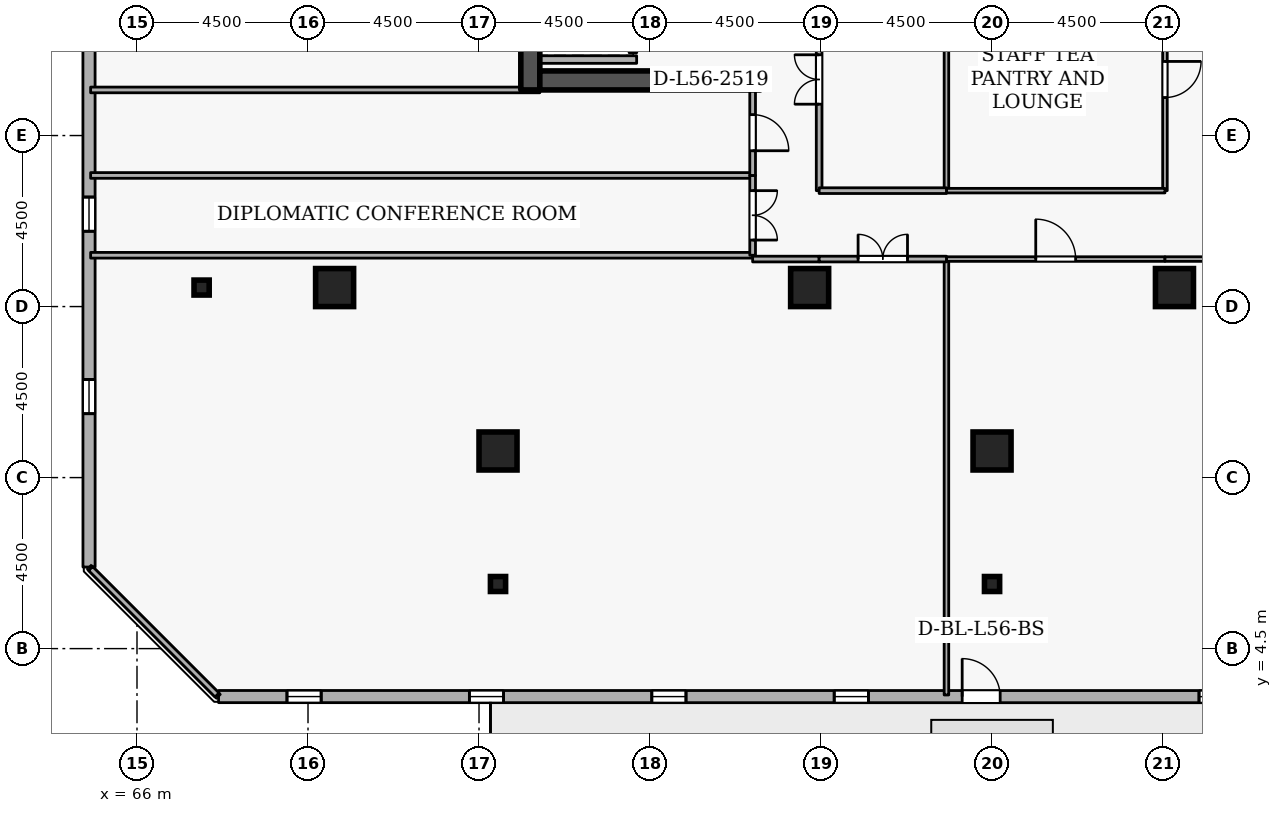
"""IFC4 building model, lengths in metres.
Left out: names, types, materials, properties, quantities, classifications, styles, units other than length and angle.
Written with IfcOpenShell. Run it as: python <this file> out.ifc"""

import sys

from ifc_helpers import new_model, si_unit, direction, frame, frame_2d, origin, origin_2d, place, context, subcontext, project, spatial, rectangle, i_section, extrude, element, fill, save


model = new_model("IFC4")
c1 = context("Model", 3, precision=1e-05, world=origin(), true_north=direction((0.0, 1.0)))
c2 = subcontext(c1, "Body", "Model", "MODEL_VIEW")
j1 = project(units=[si_unit("LENGTHUNIT", "METRE"), si_unit("PLANEANGLEUNIT", "RADIAN")], contexts=[c1])
p1 = place(None, origin())
s1 = spatial("IfcSite", under=j1, at=p1, CompositionType="ELEMENT")
p2 = place(p1, origin())
s2 = spatial("IfcBuilding", under=s1, at=p2, CompositionType="ELEMENT")
p3 = place(p2, frame((0.0, 0.0, 210.9)))
s3 = spatial("IfcBuildingStorey", under=s2, at=p3, CompositionType="ELEMENT", Elevation=210.9)
p4 = place(p3, frame((76.35, 19.2, 0.0), z_axis=(0.0, 0.0, 1.0), x_axis=(0.0, 1.0, 0.0)))
e1 = element("IfcWall", 1, at=p4, inside=s3, PredefinedType="SHEAR", context=c2, shape_type="SweptSolid", body=[
    extrude(rectangle(XDim=15.6, YDim=0.5, at=frame_2d((7.8, 0.0))), origin(), (0.0, 0.0, 1.0), 3.6),
])
p5 = place(p3, frame((76.6, 19.45, 0.0), z_axis=(0.0, 0.0, 1.0), x_axis=(1.0, 0.0, 0.0)))
e2 = element("IfcWall", 2, at=p5, inside=s3, PredefinedType="SHEAR", context=c2, shape_type="SweptSolid", body=[
    extrude(rectangle(XDim=5.8, YDim=0.5, at=frame_2d((2.9, 0.0))), origin(), (0.0, 0.0, 1.0), 3.6),
])
for number, where, z_axis, x_axis in (
    (3, (71.2, 14.0, 0.0), (0.0, 0.0, 1.0), (1.0, 0.0, 0.0)),
    (4, (88.5, 9.7, 0.0), (0.0, 0.0, 1.0), (1.0, 0.0, 0.0)),
    (5, (75.5, 9.7, 0.0), (0.0, 0.0, 1.0), (1.0, 0.0, 0.0)),
    (6, (93.3, 14.0, 0.0), (0.0, 0.0, 1.0), (1.0, 0.0, 0.0)),
    (7, (83.7, 14.0, 0.0), (0.0, 0.0, 1.0), (1.0, 0.0, 0.0)),
):
    element("IfcColumn", number, at=place(p3, frame(where, z_axis=z_axis, x_axis=x_axis)), inside=s3, PredefinedType="COLUMN", context=c2, shape_type="SweptSolid", body=[
        extrude(rectangle(XDim=1.0, YDim=1.0, at=origin_2d()), origin(), (0.0, 0.0, 1.0), 3.6),
    ])
for number, where, z_axis, x_axis in (
    (8, (67.7, 14.0, 0.0), (0.0, 0.0, 1.0), (1.0, 0.0, 0.0)),
    (9, (88.5, 6.2, 0.0), (0.0, 0.0, 1.0), (1.0, 0.0, 0.0)),
    (10, (75.5, 6.2, 0.0), (0.0, 0.0, 1.0), (1.0, 0.0, 0.0)),
):
    element("IfcColumn", number, at=place(p3, frame(where, z_axis=z_axis, x_axis=x_axis)), inside=s3, PredefinedType="COLUMN", context=c2, shape_type="SweptSolid", body=[
        extrude(i_section(OverallWidth=0.399, OverallDepth=0.394, WebThickness=0.023, FlangeThickness=0.037, FilletRadius=0.015, at=origin_2d()), origin(), (0.0, 0.0, 1.0), 3.6),
    ])
p6 = place(p3, frame((68.146, 3.238, 0.0), z_axis=(0.0, 0.0, 1.0), x_axis=(0.999999997144, -7.5574884e-05, 0.0)))
e11 = element("IfcWall", 11, at=p6, inside=s3, PredefinedType="STANDARD", context=c2, shape_type="SweptSolid", body=[
    extrude(rectangle(XDim=35.535, YDim=0.32, at=frame_2d((17.768, 0.0))), origin(), (0.0, 0.0, 1.0), 2.7),
])
p7 = place(p6, frame((19.567, 0.0, 0.0)))
e12 = element("IfcOpeningElement", 12, at=p7, cuts=e11, PredefinedType="OPENING", context=c2, shape_type="SweptSolid", body=[
    extrude(rectangle(XDim=1.0, YDim=2.08, at=frame_2d((0.5, 1.04))), frame((0.0, 0.17, 0.0), z_axis=(0.0, -1.0, 0.0), x_axis=(1.0, 0.0, 0.0)), (0.0, 0.0, 1.0), 0.34),
])
p8 = place(p6, frame((1.8, 0.0, 0.72)))
e13 = element("IfcOpeningElement", 13, at=p8, cuts=e11, PredefinedType="OPENING", context=c2, shape_type="SweptSolid", body=[
    extrude(rectangle(XDim=0.9, YDim=1.75, at=frame_2d((0.45, 0.875))), frame((0.0, 0.17, 0.0), z_axis=(0.0, -1.0, 0.0), x_axis=(1.0, 0.0, 0.0)), (0.0, 0.0, 1.0), 0.34),
])
p9 = place(p6, frame((6.6, 0.0, 0.72)))
e14 = element("IfcOpeningElement", 14, at=p9, cuts=e11, PredefinedType="OPENING", context=c2, shape_type="SweptSolid", body=[
    extrude(rectangle(XDim=0.9, YDim=1.75, at=frame_2d((0.45, 0.875))), frame((0.0, 0.17, 0.0), z_axis=(0.0, -1.0, 0.0), x_axis=(1.0, 0.0, 0.0)), (0.0, 0.0, 1.0), 0.34),
])
p10 = place(p6, frame((11.4, 0.0, 0.72)))
e15 = element("IfcOpeningElement", 15, at=p10, cuts=e11, PredefinedType="OPENING", context=c2, shape_type="SweptSolid", body=[
    extrude(rectangle(XDim=0.9, YDim=1.75, at=frame_2d((0.45, 0.875))), frame((0.0, 0.17, 0.0), z_axis=(0.0, -1.0, 0.0), x_axis=(1.0, 0.0, 0.0)), (0.0, 0.0, 1.0), 0.34),
])
p11 = place(p6, frame((16.2, 0.0, 0.72)))
e16 = element("IfcOpeningElement", 16, at=p11, cuts=e11, PredefinedType="OPENING", context=c2, shape_type="SweptSolid", body=[
    extrude(rectangle(XDim=0.9, YDim=1.75, at=frame_2d((0.45, 0.875))), frame((0.0, 0.17, 0.0), z_axis=(0.0, -1.0, 0.0), x_axis=(1.0, 0.0, 0.0)), (0.0, 0.0, 1.0), 0.34),
])
p12 = place(p6, frame((25.8, 0.0, 0.72)))
e17 = element("IfcOpeningElement", 17, at=p12, cuts=e11, PredefinedType="OPENING", context=c2, shape_type="SweptSolid", body=[
    extrude(rectangle(XDim=0.9, YDim=1.75, at=frame_2d((0.45, 0.875))), frame((0.0, 0.17, 0.0), z_axis=(0.0, -1.0, 0.0), x_axis=(1.0, 0.0, 0.0)), (0.0, 0.0, 1.0), 0.34),
])
p13 = place(p6, frame((30.6, 0.0, 0.72)))
e18 = element("IfcOpeningElement", 18, at=p13, cuts=e11, PredefinedType="OPENING", context=c2, shape_type="SweptSolid", body=[
    extrude(rectangle(XDim=0.9, YDim=1.75, at=frame_2d((0.45, 0.875))), frame((0.0, 0.17, 0.0), z_axis=(0.0, -1.0, 0.0), x_axis=(1.0, 0.0, 0.0)), (0.0, 0.0, 1.0), 0.34),
])
p14 = place(p3, frame((64.735, 42.181, 0.0), z_axis=(0.0, 0.0, 1.0), x_axis=(7.5574884e-05, -0.999999997144, 0.0)))
e19 = element("IfcWall", 19, at=p14, inside=s3, PredefinedType="STANDARD", context=c2, shape_type="SweptSolid", body=[
    extrude(rectangle(XDim=35.535, YDim=0.32, at=frame_2d((17.768, 0.0))), origin(), (0.0, 0.0, 1.0), 2.7),
])
p15 = place(p14, frame((1.8, 0.0, 0.72)))
e20 = element("IfcOpeningElement", 20, at=p15, cuts=e19, PredefinedType="OPENING", context=c2, shape_type="SweptSolid", body=[
    extrude(rectangle(XDim=0.9, YDim=1.75, at=frame_2d((0.45, 0.875))), frame((0.0, 0.17, 0.0), z_axis=(0.0, -1.0, 0.0), x_axis=(1.0, 0.0, 0.0)), (0.0, 0.0, 1.0), 0.34),
])
p16 = place(p14, frame((6.6, 0.0, 0.72)))
e21 = element("IfcOpeningElement", 21, at=p16, cuts=e19, PredefinedType="OPENING", context=c2, shape_type="SweptSolid", body=[
    extrude(rectangle(XDim=0.9, YDim=1.75, at=frame_2d((0.45, 0.875))), frame((0.0, 0.17, 0.0), z_axis=(0.0, -1.0, 0.0), x_axis=(1.0, 0.0, 0.0)), (0.0, 0.0, 1.0), 0.34),
])
p17 = place(p14, frame((11.4, 0.0, 0.72)))
e22 = element("IfcOpeningElement", 22, at=p17, cuts=e19, PredefinedType="OPENING", context=c2, shape_type="SweptSolid", body=[
    extrude(rectangle(XDim=0.9, YDim=1.75, at=frame_2d((0.45, 0.875))), frame((0.0, 0.17, 0.0), z_axis=(0.0, -1.0, 0.0), x_axis=(1.0, 0.0, 0.0)), (0.0, 0.0, 1.0), 0.34),
])
p18 = place(p14, frame((16.2, 0.0, 0.72)))
e23 = element("IfcOpeningElement", 23, at=p18, cuts=e19, PredefinedType="OPENING", context=c2, shape_type="SweptSolid", body=[
    extrude(rectangle(XDim=0.9, YDim=1.75, at=frame_2d((0.45, 0.875))), frame((0.0, 0.17, 0.0), z_axis=(0.0, -1.0, 0.0), x_axis=(1.0, 0.0, 0.0)), (0.0, 0.0, 1.0), 0.34),
])
p19 = place(p14, frame((21.0, 0.0, 0.72)))
e24 = element("IfcOpeningElement", 24, at=p19, cuts=e19, PredefinedType="OPENING", context=c2, shape_type="SweptSolid", body=[
    extrude(rectangle(XDim=0.9, YDim=1.75, at=frame_2d((0.45, 0.875))), frame((0.0, 0.17, 0.0), z_axis=(0.0, -1.0, 0.0), x_axis=(1.0, 0.0, 0.0)), (0.0, 0.0, 1.0), 0.34),
])
p20 = place(p14, frame((25.8, 0.0, 0.72)))
e25 = element("IfcOpeningElement", 25, at=p20, cuts=e19, PredefinedType="OPENING", context=c2, shape_type="SweptSolid", body=[
    extrude(rectangle(XDim=0.9, YDim=1.75, at=frame_2d((0.45, 0.875))), frame((0.0, 0.17, 0.0), z_axis=(0.0, -1.0, 0.0), x_axis=(1.0, 0.0, 0.0)), (0.0, 0.0, 1.0), 0.34),
])
p21 = place(p14, frame((30.6, 0.0, 0.72)))
e26 = element("IfcOpeningElement", 26, at=p21, cuts=e19, PredefinedType="OPENING", context=c2, shape_type="SweptSolid", body=[
    extrude(rectangle(XDim=0.9, YDim=1.75, at=frame_2d((0.45, 0.875))), frame((0.0, 0.17, 0.0), z_axis=(0.0, -1.0, 0.0), x_axis=(1.0, 0.0, 0.0)), (0.0, 0.0, 1.0), 0.34),
])
p22 = place(p3, frame((79.05, 20.18, 0.0), z_axis=(0.0, 0.0, 1.0), x_axis=(0.0, 1.0, 0.0)))
e27 = element("IfcWall", 27, at=p22, inside=s3, PredefinedType="STANDARD", context=c2, shape_type="SweptSolid", body=[
    extrude(rectangle(XDim=1.94, YDim=0.2, at=frame_2d((0.97, 0.0))), origin(), (0.0, 0.0, 1.0), 3.34),
])
p23 = place(p22, frame((0.46, 0.0, 0.0)))
e28 = element("IfcOpeningElement", 28, at=p23, cuts=e27, PredefinedType="OPENING", context=c2, shape_type="SweptSolid", body=[
    extrude(rectangle(XDim=1.02, YDim=2.06, at=frame_2d((0.51, 1.03))), frame((0.0, 0.11, 0.0), z_axis=(0.0, -1.0, 0.0), x_axis=(1.0, 0.0, 0.0)), (0.0, 0.0, 1.0), 0.22),
])
p24 = place(p3, frame((76.612, 20.0, 0.0), z_axis=(0.0, 0.0, 1.0), x_axis=(1.0, 0.0, 0.0)))
e29 = element("IfcWall", 29, at=p24, inside=s3, PredefinedType="STANDARD", context=c2, shape_type="SweptSolid", body=[
    extrude(rectangle(XDim=2.536, YDim=0.2, at=frame_2d((1.268, 0.0))), origin(), (0.0, 0.0, 1.0), 3.34),
])
for number, where, z_axis, x_axis in (
    (30, (82.2, 14.85, 0.0), (0.0, 0.0, 1.0), (-1.0, 0.0, 0.0)),
    (31, (64.78, 16.95, 0.0), (0.0, 0.0, 1.0), (1.0, 0.0, 0.0)),
):
    element("IfcWall", number, at=place(p3, frame(where, z_axis=z_axis, x_axis=x_axis)), inside=s3, PredefinedType="PARTITIONING", context=c2, shape_type="SweptSolid", body=[
        extrude(rectangle(XDim=17.42, YDim=0.15, at=frame_2d((8.71, 0.0))), origin(), (0.0, 0.0, 1.0), 3.34),
    ])
p25 = place(p3, frame((82.2, 16.95, 0.0), z_axis=(0.0, 0.0, 1.0), x_axis=(0.0, -1.0, 0.0)))
e32 = element("IfcWall", 32, at=p25, inside=s3, PredefinedType="PARTITIONING", context=c2, shape_type="SweptSolid", body=[
    extrude(rectangle(XDim=2.1, YDim=0.15, at=frame_2d((1.05, 0.0))), origin(), (0.0, 0.0, 1.0), 3.34),
])
p26 = place(p25, frame((0.4, 0.0, 0.0)))
e33 = element("IfcOpeningElement", 33, at=p26, cuts=e32, PredefinedType="OPENING", context=c2, shape_type="SweptSolid", body=[
    extrude(rectangle(XDim=1.3, YDim=2.12, at=frame_2d((0.65, 1.06))), frame((0.0, 0.085, 0.0), z_axis=(0.0, -1.0, 0.0), x_axis=(1.0, 0.0, 0.0)), (0.0, 0.0, 1.0), 0.17),
])
p27 = place(p3, frame((64.78, 19.2, 0.0), z_axis=(0.0, 0.0, 1.0), x_axis=(1.0, 0.0, 0.0)))
e34 = element("IfcWall", 34, at=p27, inside=s3, PredefinedType="PARTITIONING", context=c2, shape_type="SweptSolid", body=[
    extrude(rectangle(XDim=11.82, YDim=0.15, at=frame_2d((5.91, 0.0))), origin(), (0.0, 0.0, 1.0), 2.545),
])
p28 = place(p3, frame((82.2, 19.2, 0.0), z_axis=(0.0, 0.0, 1.0), x_axis=(0.0, -1.0, 0.0)))
e35 = element("IfcWall", 35, at=p28, inside=s3, PredefinedType="PARTITIONING", context=c2, shape_type="SweptSolid", body=[
    extrude(rectangle(XDim=2.25, YDim=0.15, at=frame_2d((1.125, 0.0))), origin(), (0.0, 0.0, 1.0), 3.34),
])
p29 = place(p28, frame((0.65, 0.0, 0.0)))
e36 = element("IfcOpeningElement", 36, at=p29, cuts=e35, PredefinedType="OPENING", context=c2, shape_type="SweptSolid", body=[
    extrude(rectangle(XDim=0.95, YDim=2.1, at=frame_2d((0.475, 1.05))), frame((0.0, 0.085, 0.0), z_axis=(0.0, -1.0, 0.0), x_axis=(1.0, 0.0, 0.0)), (0.0, 0.0, 1.0), 0.17),
])
p30 = place(p3, frame((87.3, 3.28, 0.0), z_axis=(0.0, 0.0, 1.0), x_axis=(0.0, 1.0, 0.0)))
e37 = element("IfcWall", 37, at=p30, inside=s3, PredefinedType="PARTITIONING", context=c2, shape_type="SweptSolid", body=[
    extrude(rectangle(XDim=11.47, YDim=0.12, at=frame_2d((5.735, 0.0))), origin(), (0.0, 0.0, 1.0), 3.34),
])
p31 = place(p3, frame((87.3, 14.75, 0.0), z_axis=(0.0, 0.0, 1.0), x_axis=(1.0, 0.0, 0.0)))
e38 = element("IfcWall", 38, at=p31, inside=s3, PredefinedType="PARTITIONING", context=c2, shape_type="SweptSolid", body=[
    extrude(rectangle(XDim=5.75, YDim=0.12, at=frame_2d((2.875, 0.0))), origin(), (0.0, 0.0, 1.0), 3.34),
])
p32 = place(p31, frame((2.35, 0.0, 0.0)))
e39 = element("IfcOpeningElement", 39, at=p32, cuts=e38, PredefinedType="OPENING", context=c2, shape_type="SweptSolid", body=[
    extrude(rectangle(XDim=1.05, YDim=2.1, at=frame_2d((0.525, 1.05))), frame((0.0, 0.07, 0.0), z_axis=(0.0, -1.0, 0.0), x_axis=(1.0, 0.0, 0.0)), (0.0, 0.0, 1.0), 0.14),
])
p33 = place(p3, frame((93.05, 14.75, 0.0), z_axis=(0.0, 0.0, 1.0), x_axis=(1.0, 0.0, 0.0)))
e40 = element("IfcWall", 40, at=p33, inside=s3, PredefinedType="PARTITIONING", context=c2, shape_type="SweptSolid", body=[
    extrude(rectangle(XDim=1.75, YDim=0.12, at=frame_2d((0.875, 0.0))), origin(), (0.0, 0.0, 1.0), 3.34),
])
p34 = place(p3, frame((68.106, 3.28, 0.0), z_axis=(0.0, 0.0, 1.0), x_axis=(-0.707106781187, 0.707106781187, 0.0)))
e41 = element("IfcWall", 41, at=p34, inside=s3, PredefinedType="PARTITIONING", context=c2, shape_type="SweptSolid", body=[
    extrude(rectangle(XDim=4.703, YDim=0.15, at=frame_2d((2.352, 0.0))), origin(), (0.0, 0.0, 1.0), 3.34),
])
p35 = place(p3, frame((82.2, 14.75, 0.0), z_axis=(0.0, 0.0, 1.0), x_axis=(1.0, 0.0, 0.0)))
e42 = element("IfcWall", 42, at=p35, inside=s3, PredefinedType="PARTITIONING", context=c2, shape_type="SweptSolid", body=[
    extrude(rectangle(XDim=1.75, YDim=0.15, at=frame_2d((0.875, 0.0))), origin(), (0.0, 0.0, 1.0), 3.34),
])
p36 = place(p3, frame((83.95, 14.75, 0.0), z_axis=(0.0, 0.0, 1.0), x_axis=(1.0, 0.0, 0.0)))
e43 = element("IfcWall", 43, at=p36, inside=s3, PredefinedType="PARTITIONING", context=c2, shape_type="SweptSolid", body=[
    extrude(rectangle(XDim=3.35, YDim=0.15, at=frame_2d((1.675, 0.0))), origin(), (0.0, 0.0, 1.0), 3.34),
])
p37 = place(p36, frame((1.025, 0.0, 0.0)))
e44 = element("IfcOpeningElement", 44, at=p37, cuts=e43, PredefinedType="OPENING", context=c2, shape_type="SweptSolid", body=[
    extrude(rectangle(XDim=1.3, YDim=2.12, at=frame_2d((0.65, 1.06))), frame((0.0, 0.085, 0.0), z_axis=(0.0, -1.0, 0.0), x_axis=(1.0, 0.0, 0.0)), (0.0, 0.0, 1.0), 0.17),
])
p38 = place(p3, frame((87.3, 16.55, 0.0), z_axis=(0.0, 0.0, 1.0), x_axis=(0.0, 1.0, 0.0)))
e45 = element("IfcWall", 45, at=p38, inside=s3, PredefinedType="PARTITIONING", context=c2, shape_type="SweptSolid", body=[
    extrude(rectangle(XDim=5.85, YDim=0.12, at=frame_2d((2.925, 0.0))), origin(), (0.0, 0.0, 1.0), 3.34),
])
p39 = place(p3, frame((93.05, 22.4, 0.0), z_axis=(0.0, 0.0, 1.0), x_axis=(0.0, -1.0, 0.0)))
e46 = element("IfcWall", 46, at=p39, inside=s3, PredefinedType="PARTITIONING", context=c2, shape_type="SweptSolid", body=[
    extrude(rectangle(XDim=5.85, YDim=0.12, at=frame_2d((2.925, 0.0))), origin(), (0.0, 0.0, 1.0), 3.34),
])
p40 = place(p39, frame((2.45, 0.0, 0.0)))
e47 = element("IfcOpeningElement", 47, at=p40, cuts=e46, PredefinedType="OPENING", context=c2, shape_type="SweptSolid", body=[
    extrude(rectangle(XDim=0.95, YDim=2.1, at=frame_2d((0.475, 1.05))), frame((0.0, 0.07, 0.0), z_axis=(0.0, -1.0, 0.0), x_axis=(1.0, 0.0, 0.0)), (0.0, 0.0, 1.0), 0.14),
])
p41 = place(p3, frame((93.05, 16.55, 0.0), z_axis=(0.0, 0.0, 1.0), x_axis=(-1.0, 0.0, 0.0)))
e48 = element("IfcWall", 48, at=p41, inside=s3, PredefinedType="PARTITIONING", context=c2, shape_type="SweptSolid", body=[
    extrude(rectangle(XDim=5.75, YDim=0.12, at=frame_2d((2.875, 0.0))), origin(), (0.0, 0.0, 1.0), 3.34),
])
p42 = place(p3, frame((83.95, 16.55, 0.0), z_axis=(0.0, 0.0, 1.0), x_axis=(0.0, 1.0, 0.0)))
e49 = element("IfcWall", 49, at=p42, inside=s3, PredefinedType="PARTITIONING", context=c2, shape_type="SweptSolid", body=[
    extrude(rectangle(XDim=5.85, YDim=0.15, at=frame_2d((2.925, 0.0))), origin(), (0.0, 0.0, 1.0), 3.34),
])
p43 = place(p42, frame((2.275, 0.0, 0.0)))
e50 = element("IfcOpeningElement", 50, at=p43, cuts=e49, PredefinedType="OPENING", context=c2, shape_type="SweptSolid", body=[
    extrude(rectangle(XDim=1.3, YDim=2.12, at=frame_2d((0.65, 1.06))), frame((0.0, 0.085, 0.0), z_axis=(0.0, -1.0, 0.0), x_axis=(1.0, 0.0, 0.0)), (0.0, 0.0, 1.0), 0.17),
])
p44 = place(p3, frame((87.3, 16.55, 0.0), z_axis=(0.0, 0.0, 1.0), x_axis=(-1.0, 0.0, 0.0)))
e51 = element("IfcWall", 51, at=p44, inside=s3, PredefinedType="PARTITIONING", context=c2, shape_type="SweptSolid", body=[
    extrude(rectangle(XDim=3.35, YDim=0.15, at=frame_2d((1.675, 0.0))), origin(), (0.0, 0.0, 1.0), 3.34),
])
p45 = place(p7, origin())
e52 = element("IfcDoor", 52, at=p45, inside=s3, OperationType="SINGLE_SWING_LEFT", PredefinedType="DOOR", context=c2, shape_type="SweptSolid", body=[
    extrude(rectangle(XDim=1.0, YDim=2.08, at=frame_2d((0.5, 1.04))), frame((0.0, 0.025, 0.0), z_axis=(0.0, -1.0, 0.0), x_axis=(1.0, 0.0, 0.0)), (0.0, 0.0, 1.0), 0.05),
])
fill(e12, e52)
p46 = place(p8, origin())
e53 = element("IfcWindow", 53, at=p46, inside=s3, PartitioningType="SINGLE_PANEL", PredefinedType="WINDOW", context=c2, shape_type="SweptSolid", body=[
    extrude(rectangle(XDim=0.9, YDim=1.75, at=frame_2d((0.45, 0.875))), frame((0.0, 0.03, 0.0), z_axis=(0.0, -1.0, 0.0), x_axis=(1.0, 0.0, 0.0)), (0.0, 0.0, 1.0), 0.06),
])
fill(e13, e53)
p47 = place(p9, origin())
e54 = element("IfcWindow", 54, at=p47, inside=s3, PartitioningType="SINGLE_PANEL", PredefinedType="WINDOW", context=c2, shape_type="SweptSolid", body=[
    extrude(rectangle(XDim=0.9, YDim=1.75, at=frame_2d((0.45, 0.875))), frame((0.0, 0.03, 0.0), z_axis=(0.0, -1.0, 0.0), x_axis=(1.0, 0.0, 0.0)), (0.0, 0.0, 1.0), 0.06),
])
fill(e14, e54)
p48 = place(p10, origin())
e55 = element("IfcWindow", 55, at=p48, inside=s3, PartitioningType="SINGLE_PANEL", PredefinedType="WINDOW", context=c2, shape_type="SweptSolid", body=[
    extrude(rectangle(XDim=0.9, YDim=1.75, at=frame_2d((0.45, 0.875))), frame((0.0, 0.03, 0.0), z_axis=(0.0, -1.0, 0.0), x_axis=(1.0, 0.0, 0.0)), (0.0, 0.0, 1.0), 0.06),
])
fill(e15, e55)
p49 = place(p11, origin())
e56 = element("IfcWindow", 56, at=p49, inside=s3, PartitioningType="SINGLE_PANEL", PredefinedType="WINDOW", context=c2, shape_type="SweptSolid", body=[
    extrude(rectangle(XDim=0.9, YDim=1.75, at=frame_2d((0.45, 0.875))), frame((0.0, 0.03, 0.0), z_axis=(0.0, -1.0, 0.0), x_axis=(1.0, 0.0, 0.0)), (0.0, 0.0, 1.0), 0.06),
])
fill(e16, e56)
p50 = place(p12, origin())
e57 = element("IfcWindow", 57, at=p50, inside=s3, PartitioningType="SINGLE_PANEL", PredefinedType="WINDOW", context=c2, shape_type="SweptSolid", body=[
    extrude(rectangle(XDim=0.9, YDim=1.75, at=frame_2d((0.45, 0.875))), frame((0.0, 0.03, 0.0), z_axis=(0.0, -1.0, 0.0), x_axis=(1.0, 0.0, 0.0)), (0.0, 0.0, 1.0), 0.06),
])
fill(e17, e57)
p51 = place(p20, origin())
e58 = element("IfcWindow", 58, at=p51, inside=s3, PartitioningType="SINGLE_PANEL", PredefinedType="WINDOW", context=c2, shape_type="SweptSolid", body=[
    extrude(rectangle(XDim=0.9, YDim=1.75, at=frame_2d((0.45, 0.875))), frame((0.0, 0.03, 0.0), z_axis=(0.0, -1.0, 0.0), x_axis=(1.0, 0.0, 0.0)), (0.0, 0.0, 1.0), 0.06),
])
fill(e25, e58)
p52 = place(p21, origin())
e59 = element("IfcWindow", 59, at=p52, inside=s3, PartitioningType="SINGLE_PANEL", PredefinedType="WINDOW", context=c2, shape_type="SweptSolid", body=[
    extrude(rectangle(XDim=0.9, YDim=1.75, at=frame_2d((0.45, 0.875))), frame((0.0, 0.03, 0.0), z_axis=(0.0, -1.0, 0.0), x_axis=(1.0, 0.0, 0.0)), (0.0, 0.0, 1.0), 0.06),
])
fill(e26, e59)
p53 = place(p26, origin())
e60 = element("IfcDoor", 60, at=p53, inside=s3, OperationType="DOUBLE_DOOR_SINGLE_SWING", PredefinedType="DOOR", context=c2, shape_type="SweptSolid", body=[
    extrude(rectangle(XDim=1.3, YDim=2.12, at=frame_2d((0.65, 1.06))), frame((0.0, 0.025, 0.0), z_axis=(0.0, -1.0, 0.0), x_axis=(1.0, 0.0, 0.0)), (0.0, 0.0, 1.0), 0.05),
])
fill(e33, e60)
p54 = place(p29, origin())
e61 = element("IfcDoor", 61, at=p54, inside=s3, OperationType="SINGLE_SWING_RIGHT", PredefinedType="DOOR", context=c2, shape_type="SweptSolid", body=[
    extrude(rectangle(XDim=0.95, YDim=2.1, at=frame_2d((0.475, 1.05))), frame((0.0, 0.025, 0.0), z_axis=(0.0, -1.0, 0.0), x_axis=(1.0, 0.0, 0.0)), (0.0, 0.0, 1.0), 0.05),
])
fill(e36, e61)
p55 = place(p32, origin())
e62 = element("IfcDoor", 62, at=p55, inside=s3, OperationType="SINGLE_SWING_LEFT", PredefinedType="DOOR", context=c2, shape_type="SweptSolid", body=[
    extrude(rectangle(XDim=1.05, YDim=2.1, at=frame_2d((0.525, 1.05))), frame((0.0, 0.025, 0.0), z_axis=(0.0, -1.0, 0.0), x_axis=(1.0, 0.0, 0.0)), (0.0, 0.0, 1.0), 0.05),
])
fill(e39, e62)
p56 = place(p37, origin())
e63 = element("IfcDoor", 63, at=p56, inside=s3, OperationType="DOUBLE_DOOR_SINGLE_SWING", PredefinedType="DOOR", context=c2, shape_type="SweptSolid", body=[
    extrude(rectangle(XDim=1.3, YDim=2.12, at=frame_2d((0.65, 1.06))), frame((0.0, 0.025, 0.0), z_axis=(0.0, -1.0, 0.0), x_axis=(1.0, 0.0, 0.0)), (0.0, 0.0, 1.0), 0.05),
])
fill(e44, e63)
p57 = place(p40, origin())
e64 = element("IfcDoor", 64, at=p57, inside=s3, OperationType="SINGLE_SWING_LEFT", PredefinedType="DOOR", context=c2, shape_type="SweptSolid", body=[
    extrude(rectangle(XDim=0.95, YDim=2.1, at=frame_2d((0.475, 1.05))), frame((0.0, 0.025, 0.0), z_axis=(0.0, -1.0, 0.0), x_axis=(1.0, 0.0, 0.0)), (0.0, 0.0, 1.0), 0.05),
])
fill(e47, e64)
p58 = place(p43, origin())
e65 = element("IfcDoor", 65, at=p58, inside=s3, OperationType="DOUBLE_DOOR_SINGLE_SWING", PredefinedType="DOOR", context=c2, shape_type="SweptSolid", body=[
    extrude(rectangle(XDim=1.3, YDim=2.12, at=frame_2d((0.65, 1.06))), frame((0.0, 0.025, 0.0), z_axis=(0.0, -1.0, 0.0), x_axis=(1.0, 0.0, 0.0)), (0.0, 0.0, 1.0), 0.05),
])
fill(e50, e65)
save(model, sys.argv[1])
